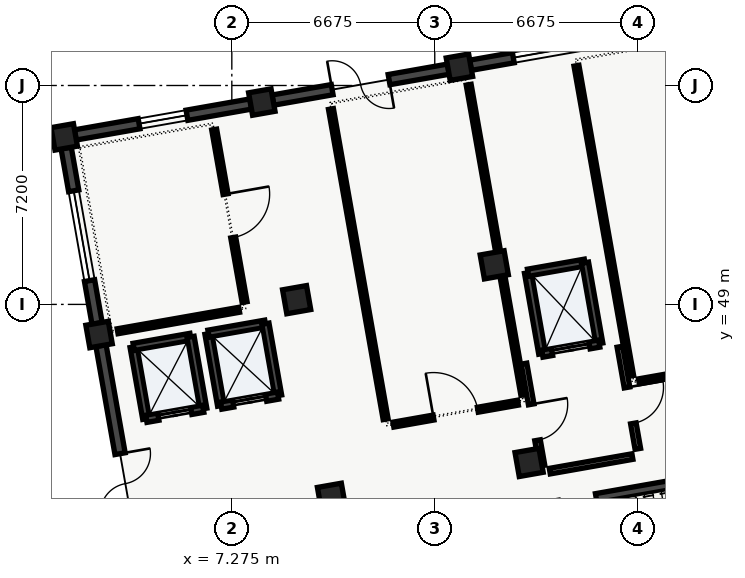
"""IFC4 building model, lengths in metres.
Left out: names, types, materials, properties, quantities, classifications, styles, units other than length and angle.
Written with IfcOpenShell. Run it as: python <this file> out.ifc"""

import sys

from ifc_helpers import new_model, si_unit, direction, frame, frame_2d, origin, origin_2d, place, context, subcontext, project, spatial, rectangle, extrude, element, fill, save


model = new_model("IFC4")
c1 = context("Model", 3, precision=1e-05, world=origin(), true_north=direction((0.0, 1.0)))
c2 = subcontext(c1, "Body", "Model", "MODEL_VIEW")
j1 = project(units=[si_unit("LENGTHUNIT", "METRE"), si_unit("PLANEANGLEUNIT", "RADIAN")], contexts=[c1])
p1 = place(None, origin())
s1 = spatial("IfcSite", under=j1, at=p1, CompositionType="ELEMENT")
p2 = place(p1, origin())
s2 = spatial("IfcBuilding", under=s1, at=p2, CompositionType="ELEMENT")
p3 = place(p2, origin())
s3 = spatial("IfcBuildingStorey", under=s2, at=p3, CompositionType="ELEMENT", Elevation=0.0)
for number, where, z_axis, x_axis in (
    (1, (2.908, 48.01, 0.0), (0.0, 0.0, 1.0), (0.985, 0.174, 0.0)),
    (2, (1.762, 54.509, 0.0), (0.0, 0.0, 1.0), (0.985, 0.174, 0.0)),
):
    element("IfcColumn", number, at=place(p3, frame(where, z_axis=z_axis, x_axis=x_axis)), inside=s3, PredefinedType="COLUMN", context=c2, shape_type="SweptSolid", body=[
        extrude(rectangle(XDim=0.75, YDim=0.75, at=origin_2d()), origin(), (0.0, 0.0, 1.0), 4.92),
    ])
for number, where, z_axis, x_axis in (
    (3, (10.554, 42.656, 0.0), (0.0, 0.0, 1.0), (0.985, 0.174, 0.0)),
    (4, (9.407, 49.156, 0.0), (0.0, 0.0, 1.0), (0.985, 0.174, 0.0)),
):
    element("IfcColumn", number, at=place(p3, frame(where, z_axis=z_axis, x_axis=x_axis)), inside=s3, PredefinedType="COLUMN", context=c2, shape_type="SweptSolid", body=[
        extrude(rectangle(XDim=0.8, YDim=0.8, at=origin_2d()), origin(), (0.0, 0.0, 1.0), 4.92),
    ])
p4 = place(p3, frame((8.261, 55.655, 0.0), z_axis=(0.0, 0.0, 1.0), x_axis=(0.984807753012, 0.173648177667, 0.0)))
e5 = element("IfcColumn", 5, at=p4, inside=s3, PredefinedType="COLUMN", context=c2, shape_type="SweptSolid", body=[
    extrude(rectangle(XDim=0.75, YDim=0.75, at=origin_2d()), origin(), (0.0, 0.0, 1.0), 4.92),
])
for number, where, z_axis, x_axis in (
    (6, (17.053, 43.802, 0.0), (0.0, 0.0, 1.0), (0.985, 0.174, 0.0)),
    (7, (15.907, 50.302, 0.0), (0.0, 0.0, 1.0), (0.985, 0.174, 0.0)),
):
    element("IfcColumn", number, at=place(p3, frame(where, z_axis=z_axis, x_axis=x_axis)), inside=s3, PredefinedType="COLUMN", context=c2, shape_type="SweptSolid", body=[
        extrude(rectangle(XDim=0.8, YDim=0.8, at=origin_2d()), origin(), (0.0, 0.0, 1.0), 4.92),
    ])
p5 = place(p3, frame((14.761, 56.801, 0.0), z_axis=(0.0, 0.0, 1.0), x_axis=(0.984807753012, 0.173648177667, 0.0)))
e8 = element("IfcColumn", 8, at=p5, inside=s3, PredefinedType="COLUMN", context=c2, shape_type="SweptSolid", body=[
    extrude(rectangle(XDim=0.75, YDim=0.75, at=origin_2d()), origin(), (0.0, 0.0, 1.0), 4.92),
])
p6 = place(p3, frame((3.99, 41.874, 0.0), z_axis=(0.0, 0.0, 1.0), x_axis=(-0.1736474839, 0.984807875342, 0.0)))
e9 = element("IfcWall", 9, at=p6, inside=s3, PredefinedType="SOLIDWALL", context=c2, shape_type="SweptSolid", body=[
    extrude(rectangle(XDim=5.86, YDim=0.34, at=frame_2d((2.93, 0.0))), origin(), (0.0, 0.0, 1.0), 4.455),
])
p7 = place(p6, frame((0.25, 0.0, 0.0)))
e10 = element("IfcOpeningElement", 10, at=p7, cuts=e9, PredefinedType="OPENING", context=c2, shape_type="SweptSolid", body=[
    extrude(rectangle(XDim=2.0, YDim=2.25, at=frame_2d((1.0, 1.125))), frame((0.0, 0.17, 0.0), z_axis=(0.0, -1.0, 0.0), x_axis=(1.0, 0.0, 0.0)), (0.0, 0.0, 1.0), 0.34),
])
p8 = place(p3, frame((2.844, 48.374, 0.0), z_axis=(0.0, 0.0, 1.0), x_axis=(-0.1736474839, 0.984807875342, 0.0)))
e11 = element("IfcWall", 11, at=p8, inside=s3, PredefinedType="SOLIDWALL", context=c2, shape_type="SweptSolid", body=[
    extrude(rectangle(XDim=5.86, YDim=0.34, at=frame_2d((2.93, 0.0))), origin(), (0.0, 0.0, 1.0), 4.455),
])
p9 = place(p8, frame((1.43, 0.0, 0.95)))
e12 = element("IfcOpeningElement", 12, at=p9, cuts=e11, PredefinedType="OPENING", context=c2, shape_type="SweptSolid", body=[
    extrude(rectangle(XDim=3.0, YDim=1.65, at=frame_2d((1.5, 0.825))), frame((0.0, 0.17, 0.0), z_axis=(0.0, -1.0, 0.0), x_axis=(1.0, 0.0, 0.0)), (0.0, 0.0, 1.0), 0.34),
])
p10 = place(p3, frame((2.126, 54.573, 0.0), z_axis=(0.0, 0.0, 1.0), x_axis=(0.984807875342, 0.1736474839, 0.0)))
e13 = element("IfcWall", 13, at=p10, inside=s3, PredefinedType="SOLIDWALL", context=c2, shape_type="SweptSolid", body=[
    extrude(rectangle(XDim=5.86, YDim=0.34, at=frame_2d((2.93, 0.0))), origin(), (0.0, 0.0, 1.0), 4.455),
])
p11 = place(p10, frame((2.13, 0.0, 0.95)))
e14 = element("IfcOpeningElement", 14, at=p11, cuts=e13, PredefinedType="OPENING", context=c2, shape_type="SweptSolid", body=[
    extrude(rectangle(XDim=1.6, YDim=1.4, at=frame_2d((0.8, 0.7))), frame((0.0, 0.17, 0.0), z_axis=(0.0, -1.0, 0.0), x_axis=(1.0, 0.0, 0.0)), (0.0, 0.0, 1.0), 0.34),
])
p12 = place(p3, frame((8.626, 55.719, 0.0), z_axis=(0.0, 0.0, 1.0), x_axis=(0.98480661901, 0.173654608793, 0.0)))
e15 = element("IfcWall", 15, at=p12, inside=s3, PredefinedType="SOLIDWALL", context=c2, shape_type="SweptSolid", body=[
    extrude(rectangle(XDim=5.86, YDim=0.34, at=frame_2d((2.93, 0.0))), origin(), (0.0, 0.0, 1.0), 4.455),
])
p13 = place(p12, frame((1.98, 0.0, 0.0)))
e16 = element("IfcOpeningElement", 16, at=p13, cuts=e15, PredefinedType="OPENING", context=c2, shape_type="SweptSolid", body=[
    extrude(rectangle(XDim=1.9, YDim=2.25, at=frame_2d((0.95, 1.125))), frame((0.0, 0.17, 0.0), z_axis=(0.0, -1.0, 0.0), x_axis=(1.0, 0.0, 0.0)), (0.0, 0.0, 1.0), 0.34),
])
p14 = place(p3, frame((15.125, 56.865, 0.0), z_axis=(0.0, 0.0, 1.0), x_axis=(0.984807875342, 0.1736474839, 0.0)))
e17 = element("IfcWall", 17, at=p14, inside=s3, PredefinedType="SOLIDWALL", context=c2, shape_type="SweptSolid", body=[
    extrude(rectangle(XDim=5.86, YDim=0.34, at=frame_2d((2.93, 0.0))), origin(), (0.0, 0.0, 1.0), 4.455),
])
p15 = place(p14, frame((1.43, 0.0, 0.95)))
e18 = element("IfcOpeningElement", 18, at=p15, cuts=e17, PredefinedType="OPENING", context=c2, shape_type="SweptSolid", body=[
    extrude(rectangle(XDim=3.0, YDim=1.65, at=frame_2d((1.5, 0.825))), frame((0.0, 0.17, 0.0), z_axis=(0.0, -1.0, 0.0), x_axis=(1.0, 0.0, 0.0)), (0.0, 0.0, 1.0), 0.34),
])
p16 = place(p3, frame((17.863, 42.381, 0.0), z_axis=(0.0, 0.0, 1.0), x_axis=(0.984808225754, 0.173645496596, 0.0)))
e19 = element("IfcWall", 19, at=p16, inside=s3, PredefinedType="SHEAR", context=c2, shape_type="SweptSolid", body=[
    extrude(rectangle(XDim=7.47, YDim=0.3, at=frame_2d((3.735, 0.0))), origin(), (0.0, 0.0, 1.0), 4.88),
])
p17 = place(p16, frame((0.18, 0.0, 0.0)))
e20 = element("IfcOpeningElement", 20, at=p17, cuts=e19, PredefinedType="OPENING", context=c2, shape_type="SweptSolid", body=[
    extrude(rectangle(XDim=1.24, YDim=2.15, at=frame_2d((0.62, 1.075))), frame((0.0, 0.15, 0.0), z_axis=(0.0, -1.0, 0.0), x_axis=(1.0, 0.0, 0.0)), (0.0, 0.0, 1.0), 0.3),
])
p18 = place(p3, frame((17.488, 47.382, 0.0), z_axis=(0.0, 0.0, 1.0), x_axis=(-0.173615102578, 0.98481358447, 0.0)))
e21 = element("IfcWall", 21, at=p18, inside=s3, PredefinedType="SHEAR", context=c2, shape_type="SweptSolid", body=[
    extrude(rectangle(XDim=2.7, YDim=0.24, at=frame_2d((1.35, 0.0))), origin(), (0.0, 0.0, 1.0), 4.88),
])
p19 = place(p3, frame((17.02, 50.041, 0.0), z_axis=(0.0, 0.0, 1.0), x_axis=(0.984815882103, 0.173602068988, 0.0)))
e22 = element("IfcWall", 22, at=p19, inside=s3, PredefinedType="SHEAR", context=c2, shape_type="SweptSolid", body=[
    extrude(rectangle(XDim=1.9, YDim=0.24, at=frame_2d((0.95, 0.0))), origin(), (0.0, 0.0, 1.0), 4.88),
])
p20 = place(p3, frame((18.891, 50.371, 0.0), z_axis=(0.0, 0.0, 1.0), x_axis=(0.173615102578, -0.98481358447, 0.0)))
e23 = element("IfcWall", 23, at=p20, inside=s3, PredefinedType="SHEAR", context=c2, shape_type="SweptSolid", body=[
    extrude(rectangle(XDim=2.7, YDim=0.24, at=frame_2d((1.35, 0.0))), origin(), (0.0, 0.0, 1.0), 4.88),
])
p21 = place(p3, frame((19.359, 47.712, 0.0), z_axis=(0.0, 0.0, 1.0), x_axis=(-0.984815882103, -0.173602068988, 0.0)))
e24 = element("IfcWall", 24, at=p21, inside=s3, PredefinedType="SHEAR", context=c2, shape_type="SweptSolid", body=[
    extrude(rectangle(XDim=1.9, YDim=0.24, at=frame_2d((0.95, 0.0))), origin(), (0.0, 0.0, 1.0), 4.88),
])
p22 = place(p21, frame((0.325, 0.0, 0.0)))
e25 = element("IfcOpeningElement", 25, at=p22, cuts=e24, PredefinedType="OPENING", context=c2, shape_type="SweptSolid", body=[
    extrude(rectangle(XDim=1.25, YDim=2.2, at=frame_2d((0.625, 1.1))), frame((0.0, 0.12, 0.0), z_axis=(0.0, -1.0, 0.0), x_axis=(1.0, 0.0, 0.0)), (0.0, 0.0, 1.0), 0.24),
])
p23 = place(p3, frame((4.463, 45.237, 0.0), z_axis=(0.0, 0.0, 1.0), x_axis=(-0.173646056486, 0.984808127031, 0.0)))
e26 = element("IfcWall", 26, at=p23, inside=s3, PredefinedType="SHEAR", context=c2, shape_type="SweptSolid", body=[
    extrude(rectangle(XDim=2.4, YDim=0.24, at=frame_2d((1.2, 0.0))), origin(), (0.0, 0.0, 1.0), 4.88),
])
p24 = place(p3, frame((4.046, 47.601, 0.0), z_axis=(0.0, 0.0, 1.0), x_axis=(0.984793905749, 0.173726691098, 0.0)))
e27 = element("IfcWall", 27, at=p24, inside=s3, PredefinedType="SHEAR", context=c2, shape_type="SweptSolid", body=[
    extrude(rectangle(XDim=1.9, YDim=0.24, at=frame_2d((0.95, 0.0))), origin(), (0.0, 0.0, 1.0), 4.88),
])
p25 = place(p3, frame((5.917, 47.931, 0.0), z_axis=(0.0, 0.0, 1.0), x_axis=(0.173646056486, -0.984808127031, 0.0)))
e28 = element("IfcWall", 28, at=p25, inside=s3, PredefinedType="SHEAR", context=c2, shape_type="SweptSolid", body=[
    extrude(rectangle(XDim=2.4, YDim=0.24, at=frame_2d((1.2, 0.0))), origin(), (0.0, 0.0, 1.0), 4.88),
])
p26 = place(p3, frame((6.334, 45.567, 0.0), z_axis=(0.0, 0.0, 1.0), x_axis=(-0.984793905749, -0.173726691098, 0.0)))
e29 = element("IfcWall", 29, at=p26, inside=s3, PredefinedType="SHEAR", context=c2, shape_type="SweptSolid", body=[
    extrude(rectangle(XDim=1.9, YDim=0.24, at=frame_2d((0.95, 0.0))), origin(), (0.0, 0.0, 1.0), 4.88),
])
p27 = place(p26, frame((0.4, 0.0, 0.0)))
e30 = element("IfcOpeningElement", 30, at=p27, cuts=e29, PredefinedType="OPENING", context=c2, shape_type="SweptSolid", body=[
    extrude(rectangle(XDim=1.1, YDim=2.2, at=frame_2d((0.55, 1.1))), frame((0.0, 0.12, 0.0), z_axis=(0.0, -1.0, 0.0), x_axis=(1.0, 0.0, 0.0)), (0.0, 0.0, 1.0), 0.24),
])
p28 = place(p3, frame((6.925, 45.671, 0.0), z_axis=(0.0, 0.0, 1.0), x_axis=(-0.173646056486, 0.984808127031, 0.0)))
e31 = element("IfcWall", 31, at=p28, inside=s3, PredefinedType="SHEAR", context=c2, shape_type="SweptSolid", body=[
    extrude(rectangle(XDim=2.4, YDim=0.24, at=frame_2d((1.2, 0.0))), origin(), (0.0, 0.0, 1.0), 4.88),
])
p29 = place(p3, frame((6.508, 48.035, 0.0), z_axis=(0.0, 0.0, 1.0), x_axis=(0.984793905749, 0.173726691098, 0.0)))
e32 = element("IfcWall", 32, at=p29, inside=s3, PredefinedType="SHEAR", context=c2, shape_type="SweptSolid", body=[
    extrude(rectangle(XDim=1.9, YDim=0.24, at=frame_2d((0.95, 0.0))), origin(), (0.0, 0.0, 1.0), 4.88),
])
p30 = place(p3, frame((8.379, 48.365, 0.0), z_axis=(0.0, 0.0, 1.0), x_axis=(0.173646056486, -0.984808127031, 0.0)))
e33 = element("IfcWall", 33, at=p30, inside=s3, PredefinedType="SHEAR", context=c2, shape_type="SweptSolid", body=[
    extrude(rectangle(XDim=2.4, YDim=0.24, at=frame_2d((1.2, 0.0))), origin(), (0.0, 0.0, 1.0), 4.88),
])
p31 = place(p3, frame((8.796, 46.001, 0.0), z_axis=(0.0, 0.0, 1.0), x_axis=(-0.984793905749, -0.173726691098, 0.0)))
e34 = element("IfcWall", 34, at=p31, inside=s3, PredefinedType="SHEAR", context=c2, shape_type="SweptSolid", body=[
    extrude(rectangle(XDim=1.9, YDim=0.24, at=frame_2d((0.95, 0.0))), origin(), (0.0, 0.0, 1.0), 4.88),
])
p32 = place(p31, frame((0.4, 0.0, 0.0)))
e35 = element("IfcOpeningElement", 35, at=p32, cuts=e34, PredefinedType="OPENING", context=c2, shape_type="SweptSolid", body=[
    extrude(rectangle(XDim=1.1, YDim=2.2, at=frame_2d((0.55, 1.1))), frame((0.0, 0.12, 0.0), z_axis=(0.0, -1.0, 0.0), x_axis=(1.0, 0.0, 0.0)), (0.0, 0.0, 1.0), 0.24),
])
p33 = place(p3, frame((17.733, 43.516, 0.0), z_axis=(0.0, 0.0, 1.0), x_axis=(0.984808483292, 0.173644035992, 0.0)))
e36 = element("IfcWall", 36, at=p33, inside=s3, PredefinedType="SOLIDWALL", context=c2, shape_type="SweptSolid", body=[
    extrude(rectangle(XDim=2.76, YDim=0.185, at=frame_2d((1.38, 0.0))), origin(), (0.0, 0.0, 1.0), 4.55),
])
p34 = place(p3, frame((20.63, 44.25, 0.0), z_axis=(0.0, 0.0, 1.0), x_axis=(-0.173621956536, 0.984812376145, 0.0)))
e37 = element("IfcWall", 37, at=p34, inside=s3, PredefinedType="SOLIDWALL", context=c2, shape_type="SweptSolid", body=[
    extrude(rectangle(XDim=3.41, YDim=0.185, at=frame_2d((1.705, 0.0))), origin(), (0.0, 0.0, 1.0), 4.55),
])
p35 = place(p34, frame((0.85, 0.0, 0.0)))
e38 = element("IfcOpeningElement", 38, at=p35, cuts=e37, PredefinedType="OPENING", context=c2, shape_type="SweptSolid", body=[
    extrude(rectangle(XDim=1.2, YDim=2.15, at=frame_2d((0.6, 1.075))), frame((0.0, 0.093, 0.0), z_axis=(0.0, -1.0, 0.0), x_axis=(1.0, 0.0, 0.0)), (0.0, 0.0, 1.0), 0.185),
])
p36 = place(p3, frame((16.886, 47.052, 0.0), z_axis=(0.0, 0.0, 1.0), x_axis=(0.173621956536, -0.984812376145, 0.0)))
e39 = element("IfcWall", 39, at=p36, inside=s3, PredefinedType="SOLIDWALL", context=c2, shape_type="SweptSolid", body=[
    extrude(rectangle(XDim=3.41, YDim=0.185, at=frame_2d((1.705, 0.0))), origin(), (0.0, 0.0, 1.0), 4.55),
])
p37 = place(p36, frame((1.36, 0.0, 0.0)))
e40 = element("IfcOpeningElement", 40, at=p37, cuts=e39, PredefinedType="OPENING", context=c2, shape_type="SweptSolid", body=[
    extrude(rectangle(XDim=1.2, YDim=2.15, at=frame_2d((0.6, 1.075))), frame((0.0, 0.093, 0.0), z_axis=(0.0, -1.0, 0.0), x_axis=(1.0, 0.0, 0.0)), (0.0, 0.0, 1.0), 0.185),
])
p38 = place(p3, frame((3.518, 48.117, 0.0), z_axis=(0.0, 0.0, 1.0), x_axis=(0.984816834462, 0.173596666326, 0.0)))
e41 = element("IfcWall", 41, at=p38, inside=s3, PredefinedType="PARTITIONING", context=c2, shape_type="SweptSolid", body=[
    extrude(rectangle(XDim=4.06, YDim=0.165, at=frame_2d((2.03, 0.0))), origin(), (0.0, 0.0, 1.0), 4.155),
])
p39 = place(p3, frame((7.695, 49.077, 0.0), z_axis=(0.0, 0.0, 1.0), x_axis=(-0.173649928941, 0.984807444214, 0.0)))
e42 = element("IfcWall", 42, at=p39, inside=s3, PredefinedType="PARTITIONING", context=c2, shape_type="SweptSolid", body=[
    extrude(rectangle(XDim=5.76, YDim=0.165, at=frame_2d((2.88, 0.0))), origin(), (0.0, 0.0, 1.0), 4.55),
])
p40 = place(p39, frame((2.155, 0.0, 0.0)))
e43 = element("IfcOpeningElement", 43, at=p40, cuts=e42, PredefinedType="OPENING", context=c2, shape_type="SweptSolid", body=[
    extrude(rectangle(XDim=1.45, YDim=2.08, at=frame_2d((0.725, 1.04))), frame((0.0, 0.083, 0.0), z_axis=(0.0, -1.0, 0.0), x_axis=(1.0, 0.0, 0.0)), (0.0, 0.0, 1.0), 0.165),
])
p41 = place(p3, frame((12.59, 45.046, 0.0), z_axis=(0.0, 0.0, 1.0), x_axis=(0.984805411783, 0.173661454915, 0.0)))
e44 = element("IfcWall", 44, at=p41, inside=s3, PredefinedType="PARTITIONING", context=c2, shape_type="SweptSolid", body=[
    extrude(rectangle(XDim=4.16, YDim=0.165, at=frame_2d((2.08, 0.0))), origin(), (0.0, 0.0, 1.0), 4.505),
])
p42 = place(p41, frame((1.34, 0.0, 0.0)))
e45 = element("IfcOpeningElement", 45, at=p42, cuts=e44, PredefinedType="OPENING", context=c2, shape_type="SweptSolid", body=[
    extrude(rectangle(XDim=1.48, YDim=2.1, at=frame_2d((0.74, 1.05))), frame((0.0, 0.083, 0.0), z_axis=(0.0, -1.0, 0.0), x_axis=(1.0, 0.0, 0.0)), (0.0, 0.0, 1.0), 0.165),
])
p43 = place(p3, frame((16.865, 46.023, 0.0), z_axis=(0.0, 0.0, 1.0), x_axis=(-0.173632075677, 0.984810592092, 0.0)))
e46 = element("IfcWall", 46, at=p43, inside=s3, PredefinedType="PARTITIONING", context=c2, shape_type="SweptSolid", body=[
    extrude(rectangle(XDim=10.36, YDim=0.165, at=frame_2d((5.18, 0.0))), origin(), (0.0, 0.0, 1.0), 4.255),
])
p44 = place(p3, frame((10.536, 55.427, 0.0), z_axis=(0.0, 0.0, 1.0), x_axis=(0.173654930775, -0.984806562233, 0.0)))
e47 = element("IfcWall", 47, at=p44, inside=s3, PredefinedType="PARTITIONING", context=c2, shape_type="SweptSolid", body=[
    extrude(rectangle(XDim=10.36, YDim=0.165, at=frame_2d((5.18, 0.0))), origin(), (0.0, 0.0, 1.0), 4.55),
])
p45 = place(p3, frame((20.665, 46.469, 0.0), z_axis=(0.0, 0.0, 1.0), x_axis=(0.98480552757, 0.173660798302, 0.0)))
e48 = element("IfcWall", 48, at=p45, inside=s3, PredefinedType="PARTITIONING", context=c2, shape_type="SweptSolid", body=[
    extrude(rectangle(XDim=10.96, YDim=0.165, at=frame_2d((5.48, 0.0))), origin(), (0.0, 0.0, 1.0), 4.505),
])
p46 = place(p45, frame((4.725, 0.0, 0.0)))
e49 = element("IfcOpeningElement", 49, at=p46, cuts=e48, PredefinedType="OPENING", context=c2, shape_type="SweptSolid", body=[
    extrude(rectangle(XDim=1.51, YDim=2.12, at=frame_2d((0.755, 1.06))), frame((0.0, 0.083, 0.0), z_axis=(0.0, -1.0, 0.0), x_axis=(1.0, 0.0, 0.0)), (0.0, 0.0, 1.0), 0.165),
])
p47 = place(p3, frame((18.611, 56.851, 0.0), z_axis=(0.0, 0.0, 1.0), x_axis=(0.173654930775, -0.984806562233, 0.0)))
e50 = element("IfcWall", 50, at=p47, inside=s3, PredefinedType="PARTITIONING", context=c2, shape_type="SweptSolid", body=[
    extrude(rectangle(XDim=10.36, YDim=0.165, at=frame_2d((5.18, 0.0))), origin(), (0.0, 0.0, 1.0), 4.55),
])
p48 = place(p7, origin())
e51 = element("IfcDoor", 51, at=p48, inside=s3, OperationType="DOUBLE_DOOR_SINGLE_SWING", PredefinedType="DOOR", context=c2, shape_type="SweptSolid", body=[
    extrude(rectangle(XDim=2.0, YDim=2.25, at=frame_2d((1.0, 1.125))), frame((0.0, 0.025, 0.0), z_axis=(0.0, -1.0, 0.0), x_axis=(1.0, 0.0, 0.0)), (0.0, 0.0, 1.0), 0.05),
])
fill(e10, e51)
p49 = place(p9, origin())
e52 = element("IfcWindow", 52, at=p49, inside=s3, PartitioningType="SINGLE_PANEL", PredefinedType="WINDOW", context=c2, shape_type="SweptSolid", body=[
    extrude(rectangle(XDim=3.0, YDim=1.65, at=frame_2d((1.5, 0.825))), frame((0.0, 0.03, 0.0), z_axis=(0.0, -1.0, 0.0), x_axis=(1.0, 0.0, 0.0)), (0.0, 0.0, 1.0), 0.06),
])
fill(e12, e52)
p50 = place(p11, origin())
e53 = element("IfcWindow", 53, at=p50, inside=s3, PartitioningType="SINGLE_PANEL", PredefinedType="WINDOW", context=c2, shape_type="SweptSolid", body=[
    extrude(rectangle(XDim=1.6, YDim=1.4, at=frame_2d((0.8, 0.7))), frame((0.0, 0.03, 0.0), z_axis=(0.0, -1.0, 0.0), x_axis=(1.0, 0.0, 0.0)), (0.0, 0.0, 1.0), 0.06),
])
fill(e14, e53)
p51 = place(p13, origin())
e54 = element("IfcDoor", 54, at=p51, inside=s3, OperationType="DOUBLE_DOOR_SINGLE_SWING", PredefinedType="DOOR", context=c2, shape_type="SweptSolid", body=[
    extrude(rectangle(XDim=1.9, YDim=2.25, at=frame_2d((0.95, 1.125))), frame((0.0, 0.025, 0.0), z_axis=(0.0, -1.0, 0.0), x_axis=(1.0, 0.0, 0.0)), (0.0, 0.0, 1.0), 0.05),
])
fill(e16, e54)
p52 = place(p15, origin())
e55 = element("IfcWindow", 55, at=p52, inside=s3, PartitioningType="SINGLE_PANEL", PredefinedType="WINDOW", context=c2, shape_type="SweptSolid", body=[
    extrude(rectangle(XDim=3.0, YDim=1.65, at=frame_2d((1.5, 0.825))), frame((0.0, 0.03, 0.0), z_axis=(0.0, -1.0, 0.0), x_axis=(1.0, 0.0, 0.0)), (0.0, 0.0, 1.0), 0.06),
])
fill(e18, e55)
p53 = place(p17, origin())
e56 = element("IfcDoor", 56, at=p53, inside=s3, OperationType="SINGLE_SWING_RIGHT", PredefinedType="DOOR", context=c2, shape_type="SweptSolid", body=[
    extrude(rectangle(XDim=1.24, YDim=2.15, at=frame_2d((0.62, 1.075))), frame((0.0, 0.025, 0.0), z_axis=(0.0, -1.0, 0.0), x_axis=(1.0, 0.0, 0.0)), (0.0, 0.0, 1.0), 0.05),
])
fill(e20, e56)
p54 = place(p22, origin())
e57 = element("IfcDoor", 57, at=p54, inside=s3, OperationType="SLIDING_TO_RIGHT", PredefinedType="DOOR", context=c2, shape_type="SweptSolid", body=[
    extrude(rectangle(XDim=1.25, YDim=2.2, at=frame_2d((0.625, 1.1))), frame((0.0, 0.025, 0.0), z_axis=(0.0, -1.0, 0.0), x_axis=(1.0, 0.0, 0.0)), (0.0, 0.0, 1.0), 0.05),
])
fill(e25, e57)
p55 = place(p27, origin())
e58 = element("IfcDoor", 58, at=p55, inside=s3, OperationType="SLIDING_TO_LEFT", PredefinedType="DOOR", context=c2, shape_type="SweptSolid", body=[
    extrude(rectangle(XDim=1.1, YDim=2.2, at=frame_2d((0.55, 1.1))), frame((0.0, 0.025, 0.0), z_axis=(0.0, -1.0, 0.0), x_axis=(1.0, 0.0, 0.0)), (0.0, 0.0, 1.0), 0.05),
])
fill(e30, e58)
p56 = place(p32, origin())
e59 = element("IfcDoor", 59, at=p56, inside=s3, OperationType="SLIDING_TO_LEFT", PredefinedType="DOOR", context=c2, shape_type="SweptSolid", body=[
    extrude(rectangle(XDim=1.1, YDim=2.2, at=frame_2d((0.55, 1.1))), frame((0.0, 0.025, 0.0), z_axis=(0.0, -1.0, 0.0), x_axis=(1.0, 0.0, 0.0)), (0.0, 0.0, 1.0), 0.05),
])
fill(e35, e59)
p57 = place(p35, origin())
e60 = element("IfcDoor", 60, at=p57, inside=s3, OperationType="SINGLE_SWING_RIGHT", PredefinedType="DOOR", context=c2, shape_type="SweptSolid", body=[
    extrude(rectangle(XDim=1.2, YDim=2.15, at=frame_2d((0.6, 1.075))), frame((0.0, 0.025, 0.0), z_axis=(0.0, -1.0, 0.0), x_axis=(1.0, 0.0, 0.0)), (0.0, 0.0, 1.0), 0.05),
])
fill(e38, e60)
p58 = place(p37, origin())
e61 = element("IfcDoor", 61, at=p58, inside=s3, OperationType="SINGLE_SWING_LEFT", PredefinedType="DOOR", context=c2, shape_type="SweptSolid", body=[
    extrude(rectangle(XDim=1.2, YDim=2.15, at=frame_2d((0.6, 1.075))), frame((0.0, 0.025, 0.0), z_axis=(0.0, -1.0, 0.0), x_axis=(1.0, 0.0, 0.0)), (0.0, 0.0, 1.0), 0.05),
])
fill(e40, e61)
p59 = place(p40, origin())
e62 = element("IfcDoor", 62, at=p59, inside=s3, OperationType="SINGLE_SWING_RIGHT", PredefinedType="DOOR", context=c2, shape_type="SweptSolid", body=[
    extrude(rectangle(XDim=1.45, YDim=2.08, at=frame_2d((0.725, 1.04))), frame((0.0, 0.025, 0.0), z_axis=(0.0, -1.0, 0.0), x_axis=(1.0, 0.0, 0.0)), (0.0, 0.0, 1.0), 0.05),
])
fill(e43, e62)
p60 = place(p42, origin())
e63 = element("IfcDoor", 63, at=p60, inside=s3, OperationType="SINGLE_SWING_LEFT", PredefinedType="DOOR", context=c2, shape_type="SweptSolid", body=[
    extrude(rectangle(XDim=1.48, YDim=2.1, at=frame_2d((0.74, 1.05))), frame((0.0, 0.025, 0.0), z_axis=(0.0, -1.0, 0.0), x_axis=(1.0, 0.0, 0.0)), (0.0, 0.0, 1.0), 0.05),
])
fill(e45, e63)
save(model, sys.argv[1])
